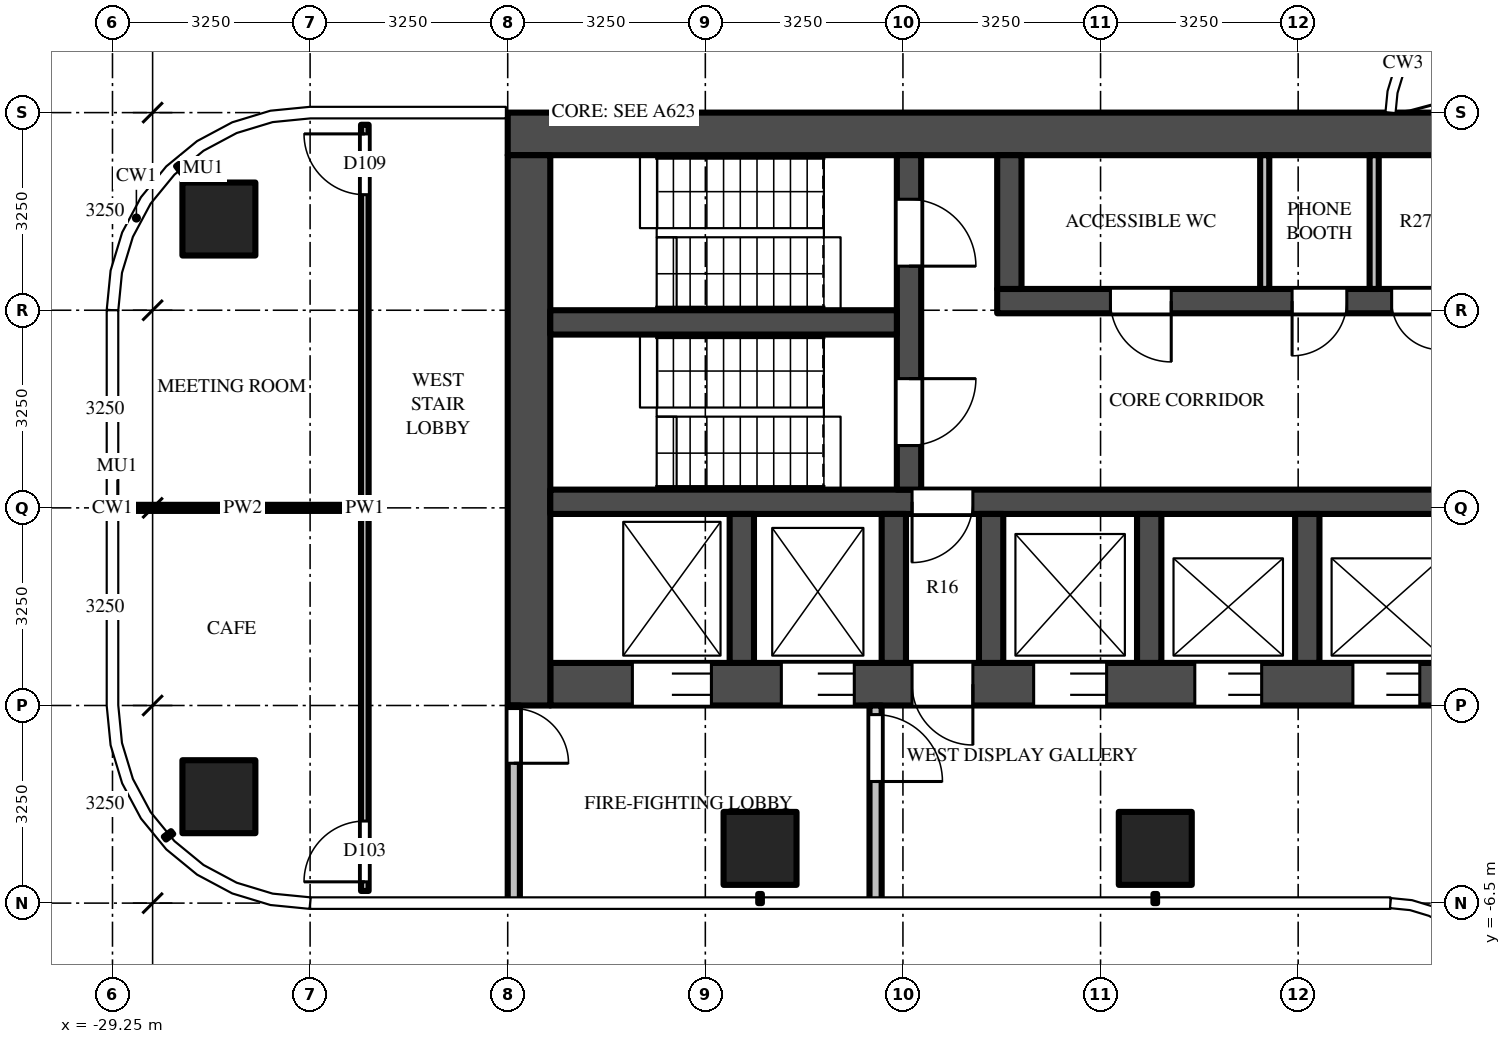
"""IFC4 building model, lengths in metres.
Left out: names, types, materials, properties, quantities, classifications, styles, units other than length and angle.
Written with IfcOpenShell. Run it as: python <this file> out.ifc"""

import sys

from ifc_helpers import new_model, si_unit, direction, frame, frame_2d, origin, origin_2d, place, context, subcontext, project, spatial, rectangle, extrude, source, transform, mapped, element, fill, save


model = new_model("IFC4")
c1 = context("Model", 3, precision=1e-05, world=origin(), true_north=direction((0.0, 1.0)))
c2 = subcontext(c1, "Body", "Model", "MODEL_VIEW")
j1 = project(units=[si_unit("LENGTHUNIT", "METRE"), si_unit("PLANEANGLEUNIT", "RADIAN")], contexts=[c1])
p1 = place(None, origin())
s1 = spatial("IfcSite", under=j1, at=p1, CompositionType="ELEMENT")
p2 = place(p1, origin())
s2 = spatial("IfcBuilding", under=s1, at=p2, CompositionType="ELEMENT")
p3 = place(p2, frame((0.0, 0.0, 193.2)))
s3 = spatial("IfcBuildingStorey", under=s2, at=p3, CompositionType="ELEMENT", Elevation=193.2)
m1 = source(origin(), c2, "Body", "SweptSolid", [
    extrude(rectangle(XDim=1.2, YDim=1.2, at=origin_2d()), origin(), (0.0, 0.0, 1.0), 3.9),
])
for number, where, z_axis, x_axis in (
    (1, (-12.1, -5.6, 0.0), (0.0, 0.0, 1.0), (1.0, 0.0, 0.0)),
    (2, (-18.6, -5.6, 0.0), (0.0, 0.0, 1.0), (1.0, 0.0, 0.0)),
    (3, (-27.5, -4.75, 0.0), (0.0, 0.0, 1.0), (1.0, 0.0, 0.0)),
    (4, (-27.5, 4.75, 0.0), (0.0, 0.0, 1.0), (1.0, 0.0, 0.0)),
):
    element("IfcColumn", number, at=place(p3, frame(where, z_axis=z_axis, x_axis=x_axis)), inside=s3, PredefinedType="COLUMN", context=c2, shape_type="MappedRepresentation", body=[
        mapped(m1, transform((0.0, 0.0, 0.0))),
    ])
m2 = source(origin(), c2, "Body", "SweptSolid", [
    extrude(rectangle(XDim=16.55, YDim=0.7, at=frame_2d((8.275, 0.0))), origin(), (0.0, 0.0, 1.0), 3.7),
])
p4 = place(p3, frame((-6.2, 6.15, 0.0), z_axis=(0.0, 0.0, 1.0), x_axis=(-1.0, 0.0, 0.0)))
e5 = element("IfcWall", 5, at=p4, inside=s3, PredefinedType="SHEAR", context=c2, shape_type="MappedRepresentation", body=[
    mapped(m2, transform((0.0, 0.0, 0.0))),
])
m3 = source(origin(), c2, "Body", "SweptSolid", [
    extrude(rectangle(XDim=14.85, YDim=0.7, at=frame_2d((7.425, 0.0))), origin(), (0.0, 0.0, 1.0), 3.7),
])
p5 = place(p3, frame((-7.2, -2.9, 0.0), z_axis=(0.0, 0.0, 1.0), x_axis=(-1.0, 0.0, 0.0)))
e6 = element("IfcWall", 6, at=p5, inside=s3, PredefinedType="SHEAR", context=c2, shape_type="MappedRepresentation", body=[
    mapped(m3, transform((0.0, 0.0, 0.0))),
])
m4 = source(origin(), c2, "Body", "SweptSolid", [
    extrude(rectangle(XDim=1.1, YDim=2.1, at=frame_2d((0.55, 1.05))), frame((0.0, 0.36, 0.0), z_axis=(0.0, -1.0, 0.0), x_axis=(1.0, 0.0, 0.0)), (0.0, 0.0, 1.0), 0.72),
])
p6 = place(p5, frame((0.55, 0.0, 0.0)))
e7 = element("IfcOpeningElement", 7, at=p6, cuts=e6, PredefinedType="OPENING", context=c2, shape_type="MappedRepresentation", body=[
    mapped(m4, transform((0.0, 0.0, 0.0))),
])
p7 = place(p5, frame((3.15, 0.0, 0.0)))
e8 = element("IfcOpeningElement", 8, at=p7, cuts=e6, PredefinedType="OPENING", context=c2, shape_type="MappedRepresentation", body=[
    mapped(m4, transform((0.0, 0.0, 0.0))),
])
m5 = source(origin(), c2, "Body", "SweptSolid", [
    extrude(rectangle(XDim=1.2, YDim=2.1, at=frame_2d((0.6, 1.05))), frame((0.0, 0.36, 0.0), z_axis=(0.0, -1.0, 0.0), x_axis=(1.0, 0.0, 0.0)), (0.0, 0.0, 1.0), 0.72),
])
p8 = place(p5, frame((5.7, 0.0, 0.0)))
e9 = element("IfcOpeningElement", 9, at=p8, cuts=e6, PredefinedType="OPENING", context=c2, shape_type="MappedRepresentation", body=[
    mapped(m5, transform((0.0, 0.0, 0.0))),
])
m6 = source(origin(), c2, "Body", "SweptSolid", [
    extrude(rectangle(XDim=1.3, YDim=2.1, at=frame_2d((0.65, 1.05))), frame((0.0, 0.36, 0.0), z_axis=(0.0, -1.0, 0.0), x_axis=(1.0, 0.0, 0.0)), (0.0, 0.0, 1.0), 0.72),
])
p9 = place(p5, frame((12.2, 0.0, 0.0)))
e10 = element("IfcOpeningElement", 10, at=p9, cuts=e6, PredefinedType="OPENING", context=c2, shape_type="MappedRepresentation", body=[
    mapped(m6, transform((0.0, 0.0, 0.0))),
])
p10 = place(p5, frame((9.85, 0.0, 0.0)))
e11 = element("IfcOpeningElement", 11, at=p10, cuts=e6, PredefinedType="OPENING", context=c2, shape_type="MappedRepresentation", body=[
    mapped(m5, transform((0.0, 0.0, 0.0))),
])
m7 = source(origin(), c2, "Body", "SweptSolid", [
    extrude(rectangle(XDim=1.0, YDim=2.1, at=frame_2d((0.5, 1.05))), frame((0.0, 0.36, 0.0), z_axis=(0.0, -1.0, 0.0), x_axis=(1.0, 0.0, 0.0)), (0.0, 0.0, 1.0), 0.72),
])
p11 = place(p5, frame((7.9, 0.0, 0.0)))
e12 = element("IfcOpeningElement", 12, at=p11, cuts=e6, PredefinedType="OPENING", context=c2, shape_type="MappedRepresentation", body=[
    mapped(m7, transform((0.0, 0.0, 0.0))),
])
m8 = source(origin(), c2, "Body", "SweptSolid", [
    extrude(rectangle(XDim=9.05, YDim=0.7, at=frame_2d((4.525, 0.0))), origin(), (0.0, 0.0, 1.0), 3.7),
])
p12 = place(p3, frame((-22.4, 5.8, 0.0), z_axis=(0.0, 0.0, 1.0), x_axis=(0.0, -1.0, 0.0)))
e13 = element("IfcWall", 13, at=p12, inside=s3, PredefinedType="SHEAR", context=c2, shape_type="MappedRepresentation", body=[
    mapped(m8, transform((0.0, 0.0, 0.0))),
])
m9 = source(origin(), c2, "Body", "SweptSolid", [
    extrude(rectangle(XDim=7.5, YDim=0.4, at=frame_2d((3.75, 0.0))), origin(), (0.0, 0.0, 1.0), 3.7),
])
p13 = place(p3, frame((-7.2, 3.4, 0.0), z_axis=(0.0, 0.0, 1.0), x_axis=(-1.0, 0.0, 0.0)))
e14 = element("IfcWall", 14, at=p13, inside=s3, PredefinedType="SHEAR", context=c2, shape_type="MappedRepresentation", body=[
    mapped(m9, transform((0.0, 0.0, 0.0))),
])
m10 = source(origin(), c2, "Body", "SweptSolid", [
    extrude(rectangle(XDim=0.8, YDim=2.1, at=frame_2d((0.4, 1.05))), frame((0.0, 0.21, 0.0), z_axis=(0.0, -1.0, 0.0), x_axis=(1.0, 0.0, 0.0)), (0.0, 0.0, 1.0), 0.42),
])
p14 = place(p13, frame((0.212, 0.0, 0.0)))
e15 = element("IfcOpeningElement", 15, at=p14, cuts=e14, PredefinedType="OPENING", context=c2, shape_type="MappedRepresentation", body=[
    mapped(m10, transform((0.0, 0.0, 0.0))),
])
m11 = source(origin(), c2, "Body", "SweptSolid", [
    extrude(rectangle(XDim=0.9, YDim=2.1, at=frame_2d((0.45, 1.05))), frame((0.0, 0.21, 0.0), z_axis=(0.0, -1.0, 0.0), x_axis=(1.0, 0.0, 0.0)), (0.0, 0.0, 1.0), 0.42),
])
p15 = place(p13, frame((1.75, 0.0, 0.0)))
e16 = element("IfcOpeningElement", 16, at=p15, cuts=e14, PredefinedType="OPENING", context=c2, shape_type="MappedRepresentation", body=[
    mapped(m11, transform((0.0, 0.0, 0.0))),
])
m12 = source(origin(), c2, "Body", "SweptSolid", [
    extrude(rectangle(XDim=1.0, YDim=2.1, at=frame_2d((0.5, 1.05))), frame((0.0, 0.21, 0.0), z_axis=(0.0, -1.0, 0.0), x_axis=(1.0, 0.0, 0.0)), (0.0, 0.0, 1.0), 0.42),
])
p16 = place(p13, frame((4.637, 0.0, 0.0)))
e17 = element("IfcOpeningElement", 17, at=p16, cuts=e14, PredefinedType="OPENING", context=c2, shape_type="MappedRepresentation", body=[
    mapped(m12, transform((0.0, 0.0, 0.0))),
])
m13 = source(origin(), c2, "Body", "SweptSolid", [
    extrude(rectangle(XDim=14.85, YDim=0.4, at=frame_2d((7.425, 0.0))), origin(), (0.0, 0.0, 1.0), 3.7),
])
p17 = place(p3, frame((-7.2, 0.1, 0.0), z_axis=(0.0, 0.0, 1.0), x_axis=(-1.0, 0.0, 0.0)))
e18 = element("IfcWall", 18, at=p17, inside=s3, PredefinedType="SHEAR", context=c2, shape_type="MappedRepresentation", body=[
    mapped(m13, transform((0.0, 0.0, 0.0))),
])
p18 = place(p17, frame((7.9, 0.0, 0.0)))
e19 = element("IfcOpeningElement", 19, at=p18, cuts=e18, PredefinedType="OPENING", context=c2, shape_type="MappedRepresentation", body=[
    mapped(m12, transform((0.0, 0.0, 0.0))),
])
m14 = source(origin(), c2, "Body", "SweptSolid", [
    extrude(rectangle(XDim=5.5, YDim=0.4, at=frame_2d((2.75, 0.0))), origin(), (0.0, 0.0, 1.0), 3.7),
])
p19 = place(p3, frame((-16.15, 5.8, 0.0), z_axis=(0.0, 0.0, 1.0), x_axis=(0.0, -1.0, 0.0)))
e20 = element("IfcWall", 20, at=p19, inside=s3, PredefinedType="SHEAR", context=c2, shape_type="MappedRepresentation", body=[
    mapped(m14, transform((0.0, 0.0, 0.0))),
])
m15 = source(origin(), c2, "Body", "SweptSolid", [
    extrude(rectangle(XDim=1.1, YDim=2.1, at=frame_2d((0.55, 1.05))), frame((0.0, 0.21, 0.0), z_axis=(0.0, -1.0, 0.0), x_axis=(1.0, 0.0, 0.0)), (0.0, 0.0, 1.0), 0.42),
])
p20 = place(p19, frame((0.725, 0.0, 0.0)))
e21 = element("IfcOpeningElement", 21, at=p20, cuts=e20, PredefinedType="OPENING", context=c2, shape_type="MappedRepresentation", body=[
    mapped(m15, transform((0.0, 0.0, 0.0))),
])
p21 = place(p19, frame((3.675, 0.0, 0.0)))
e22 = element("IfcOpeningElement", 22, at=p21, cuts=e20, PredefinedType="OPENING", context=c2, shape_type="MappedRepresentation", body=[
    mapped(m15, transform((0.0, 0.0, 0.0))),
])
m16 = source(origin(), c2, "Body", "SweptSolid", [
    extrude(rectangle(XDim=5.7, YDim=0.4, at=frame_2d((2.85, 0.0))), origin(), (0.0, 0.0, 1.0), 3.7),
])
p22 = place(p3, frame((-16.35, 3.05, 0.0), z_axis=(0.0, 0.0, 1.0), x_axis=(-1.0, 0.0, 0.0)))
e23 = element("IfcWall", 23, at=p22, inside=s3, PredefinedType="SHEAR", context=c2, shape_type="MappedRepresentation", body=[
    mapped(m16, transform((0.0, 0.0, 0.0))),
])
m17 = source(origin(), c2, "Body", "SweptSolid", [
    extrude(rectangle(XDim=2.2, YDim=0.4, at=frame_2d((1.1, 0.0))), origin(), (0.0, 0.0, 1.0), 3.7),
])
p23 = place(p3, frame((-14.5, 5.8, 0.0), z_axis=(0.0, 0.0, 1.0), x_axis=(0.0, -1.0, 0.0)))
e24 = element("IfcWall", 24, at=p23, inside=s3, PredefinedType="SHEAR", context=c2, shape_type="MappedRepresentation", body=[
    mapped(m17, transform((0.0, 0.0, 0.0))),
])
m18 = source(origin(), c2, "Body", "SweptSolid", [
    extrude(rectangle(XDim=2.45, YDim=0.4, at=frame_2d((1.225, 0.0))), origin(), (0.0, 0.0, 1.0), 3.7),
])
for number, where, z_axis, x_axis in (
    (25, (-9.6, -0.1, 0.0), (0.0, 0.0, 1.0), (0.0, -1.0, 0.0)),
    (26, (-12.2, -0.1, 0.0), (0.0, 0.0, 1.0), (0.0, -1.0, 0.0)),
    (27, (-14.8, -0.1, 0.0), (0.0, 0.0, 1.0), (0.0, -1.0, 0.0)),
    (28, (-16.4, -0.1, 0.0), (0.0, 0.0, 1.0), (0.0, -1.0, 0.0)),
    (29, (-18.9, -0.1, 0.0), (0.0, 0.0, 1.0), (0.0, -1.0, 0.0)),
):
    element("IfcWall", number, at=place(p3, frame(where, z_axis=z_axis, x_axis=x_axis)), inside=s3, PredefinedType="SHEAR", context=c2, shape_type="MappedRepresentation", body=[
        mapped(m18, transform((0.0, 0.0, 0.0))),
    ])
m19 = source(origin(), c2, "Body", "SweptSolid", [
    extrude(rectangle(XDim=3.25, YDim=0.2, at=frame_2d((1.625, 0.0))), origin(), (0.0, 0.0, 1.0), 3.7),
])
p24 = place(p3, frame((-16.7, -3.25, 0.0), z_axis=(0.0, 0.0, 1.0), x_axis=(0.0, -1.0, 0.0)))
e30 = element("IfcWall", 30, at=p24, inside=s3, PredefinedType="PARTITIONING", context=c2, shape_type="MappedRepresentation", body=[
    mapped(m19, transform((0.0, 0.0, 0.0))),
])
m20 = source(origin(), c2, "Body", "SweptSolid", [
    extrude(rectangle(XDim=1.1, YDim=2.1, at=frame_2d((0.55, 1.05))), frame((0.0, 0.11, 0.0), z_axis=(0.0, -1.0, 0.0), x_axis=(1.0, 0.0, 0.0)), (0.0, 0.0, 1.0), 0.22),
])
p25 = place(p24, frame((0.15, 0.0, 0.0)))
e31 = element("IfcOpeningElement", 31, at=p25, cuts=e30, PredefinedType="OPENING", context=c2, shape_type="MappedRepresentation", body=[
    mapped(m20, transform((0.0, 0.0, 0.0))),
])
p26 = place(p3, frame((-22.65, -3.25, 0.0), z_axis=(0.0, 0.0, 1.0), x_axis=(0.0, -1.0, 0.0)))
e32 = element("IfcWall", 32, at=p26, inside=s3, PredefinedType="PARTITIONING", context=c2, shape_type="MappedRepresentation", body=[
    mapped(m19, transform((0.0, 0.0, 0.0))),
])
m21 = source(origin(), c2, "Body", "SweptSolid", [
    extrude(rectangle(XDim=0.9, YDim=2.1, at=frame_2d((0.45, 1.05))), frame((0.0, 0.11, 0.0), z_axis=(0.0, -1.0, 0.0), x_axis=(1.0, 0.0, 0.0)), (0.0, 0.0, 1.0), 0.22),
])
p27 = place(p26, frame((0.05, 0.0, 0.0)))
e33 = element("IfcOpeningElement", 33, at=p27, cuts=e32, PredefinedType="OPENING", context=c2, shape_type="MappedRepresentation", body=[
    mapped(m21, transform((0.0, 0.0, 0.0))),
])
m22 = source(origin(), c2, "Body", "SweptSolid", [
    extrude(rectangle(XDim=2.2, YDim=0.15, at=frame_2d((1.1, 0.0))), origin(), (0.0, 0.0, 1.0), 3.7),
])
for number, where, z_axis, x_axis in (
    (34, (-8.5, 5.8, 0.0), (0.0, 0.0, 1.0), (0.0, -1.0, 0.0)),
    (35, (-10.3, 5.8, 0.0), (0.0, 0.0, 1.0), (0.0, -1.0, 0.0)),
):
    element("IfcWall", number, at=place(p3, frame(where, z_axis=z_axis, x_axis=x_axis)), inside=s3, PredefinedType="PARTITIONING", context=c2, shape_type="MappedRepresentation", body=[
        mapped(m22, transform((0.0, 0.0, 0.0))),
    ])
m23 = source(origin(), c2, "Body", "SweptSolid", [
    extrude(rectangle(XDim=12.6, YDim=0.125, at=frame_2d((6.3, 0.0))), origin(), (0.0, 0.0, 1.0), 2.78),
])
p28 = place(p3, frame((-25.1, -6.3, 0.0), z_axis=(0.0, 0.0, 1.0), x_axis=(0.0, 1.0, 0.0)))
e36 = element("IfcWall", 36, at=p28, inside=s3, PredefinedType="PARTITIONING", context=c2, shape_type="MappedRepresentation", body=[
    mapped(m23, transform((0.0, 0.0, 0.0))),
])
m24 = source(origin(), c2, "Body", "SweptSolid", [
    extrude(rectangle(XDim=1.0, YDim=2.1, at=frame_2d((0.5, 1.05))), frame((0.0, 0.073, 0.0), z_axis=(0.0, -1.0, 0.0), x_axis=(1.0, 0.0, 0.0)), (0.0, 0.0, 1.0), 0.145),
])
p29 = place(p28, frame((0.15, 0.0, 0.0)))
e37 = element("IfcOpeningElement", 37, at=p29, cuts=e36, PredefinedType="OPENING", context=c2, shape_type="MappedRepresentation", body=[
    mapped(m24, transform((0.0, 0.0, 0.0))),
])
p30 = place(p28, frame((11.45, 0.0, 0.0)))
e38 = element("IfcOpeningElement", 38, at=p30, cuts=e36, PredefinedType="OPENING", context=c2, shape_type="MappedRepresentation", body=[
    mapped(m24, transform((0.0, 0.0, 0.0))),
])
m25 = source(origin(), c2, "Body", "SweptSolid", [
    extrude(rectangle(XDim=3.887, YDim=0.1, at=frame_2d((1.944, 0.0))), origin(), (0.0, 0.0, 1.0), 2.78),
])
p31 = place(p3, frame((-29.05, 0.0, 0.0), z_axis=(0.0, 0.0, 1.0), x_axis=(1.0, 0.0, 0.0)))
e39 = element("IfcWall", 39, at=p31, inside=s3, PredefinedType="PARTITIONING", context=c2, shape_type="MappedRepresentation", body=[
    mapped(m25, transform((0.0, 0.0, 0.0))),
])
m26 = source(origin(), c2, "Body", "SweptSolid", [
    extrude(rectangle(XDim=1.1, YDim=2.1, at=frame_2d((0.55, 1.05))), frame((0.0, -0.275, 0.0), z_axis=(0.0, -1.0, 0.0), x_axis=(1.0, 0.0, 0.0)), (0.0, 0.0, 1.0), 0.05),
])
p32 = place(p6, origin())
e40 = element("IfcDoor", 40, at=p32, inside=s3, OperationType="DOUBLE_DOOR_SLIDING", PredefinedType="DOOR", context=c2, shape_type="MappedRepresentation", body=[
    mapped(m26, transform((0.0, 0.0, 0.0))),
])
fill(e7, e40)
p33 = place(p7, origin())
e41 = element("IfcDoor", 41, at=p33, inside=s3, OperationType="DOUBLE_DOOR_SLIDING", PredefinedType="DOOR", context=c2, shape_type="MappedRepresentation", body=[
    mapped(m26, transform((0.0, 0.0, 0.0))),
])
fill(e8, e41)
m27 = source(origin(), c2, "Body", "SweptSolid", [
    extrude(rectangle(XDim=1.2, YDim=2.1, at=frame_2d((0.6, 1.05))), frame((0.0, -0.275, 0.0), z_axis=(0.0, -1.0, 0.0), x_axis=(1.0, 0.0, 0.0)), (0.0, 0.0, 1.0), 0.05),
])
p34 = place(p8, origin())
e42 = element("IfcDoor", 42, at=p34, inside=s3, OperationType="DOUBLE_DOOR_SLIDING", PredefinedType="DOOR", context=c2, shape_type="MappedRepresentation", body=[
    mapped(m27, transform((0.0, 0.0, 0.0))),
])
fill(e9, e42)
m28 = source(origin(), c2, "Body", "SweptSolid", [
    extrude(rectangle(XDim=1.3, YDim=2.1, at=frame_2d((0.65, 1.05))), frame((0.0, -0.275, 0.0), z_axis=(0.0, -1.0, 0.0), x_axis=(1.0, 0.0, 0.0)), (0.0, 0.0, 1.0), 0.05),
])
p35 = place(p9, origin())
e43 = element("IfcDoor", 43, at=p35, inside=s3, OperationType="DOUBLE_DOOR_SLIDING", PredefinedType="DOOR", context=c2, shape_type="MappedRepresentation", body=[
    mapped(m28, transform((0.0, 0.0, 0.0))),
])
fill(e10, e43)
p36 = place(p10, origin())
e44 = element("IfcDoor", 44, at=p36, inside=s3, OperationType="DOUBLE_DOOR_SLIDING", PredefinedType="DOOR", context=c2, shape_type="MappedRepresentation", body=[
    mapped(m27, transform((0.0, 0.0, 0.0))),
])
fill(e11, e44)
m29 = source(origin(), c2, "Body", "SweptSolid", [
    extrude(rectangle(XDim=1.1, YDim=2.1, at=frame_2d((0.55, 1.05))), frame((0.0, 0.025, 0.0), z_axis=(0.0, -1.0, 0.0), x_axis=(1.0, 0.0, 0.0)), (0.0, 0.0, 1.0), 0.05),
])
p37 = place(p20, origin())
e45 = element("IfcDoor", 45, at=p37, inside=s3, OperationType="SINGLE_SWING_RIGHT", PredefinedType="DOOR", context=c2, shape_type="MappedRepresentation", body=[
    mapped(m29, transform((0.0, 0.0, 0.0))),
])
fill(e21, e45)
p38 = place(p21, origin())
e46 = element("IfcDoor", 46, at=p38, inside=s3, OperationType="SINGLE_SWING_LEFT", PredefinedType="DOOR", context=c2, shape_type="MappedRepresentation", body=[
    mapped(m29, transform((0.0, 0.0, 0.0))),
])
fill(e22, e46)
m30 = source(origin(), c2, "Body", "SweptSolid", [
    extrude(rectangle(XDim=1.0, YDim=2.1, at=frame_2d((0.5, 1.05))), frame((0.0, 0.025, 0.0), z_axis=(0.0, -1.0, 0.0), x_axis=(1.0, 0.0, 0.0)), (0.0, 0.0, 1.0), 0.05),
])
p39 = place(p18, origin())
e47 = element("IfcDoor", 47, at=p39, inside=s3, OperationType="SINGLE_SWING_RIGHT", PredefinedType="DOOR", context=c2, shape_type="MappedRepresentation", body=[
    mapped(m30, transform((0.0, 0.0, 0.0))),
])
fill(e19, e47)
m31 = source(origin(), c2, "Body", "SweptSolid", [
    extrude(rectangle(XDim=1.0, YDim=2.1, at=frame_2d((0.5, 1.05))), frame((0.0, -0.275, 0.0), z_axis=(0.0, -1.0, 0.0), x_axis=(1.0, 0.0, 0.0)), (0.0, 0.0, 1.0), 0.05),
])
p40 = place(p11, origin())
e48 = element("IfcDoor", 48, at=p40, inside=s3, OperationType="SINGLE_SWING_LEFT", PredefinedType="DOOR", context=c2, shape_type="MappedRepresentation", body=[
    mapped(m31, transform((0.0, 0.0, 0.0))),
])
fill(e12, e48)
p41 = place(p25, origin())
e49 = element("IfcDoor", 49, at=p41, inside=s3, OperationType="SINGLE_SWING_RIGHT", PredefinedType="DOOR", context=c2, shape_type="MappedRepresentation", body=[
    mapped(m29, transform((0.0, 0.0, 0.0))),
])
fill(e31, e49)
m32 = source(origin(), c2, "Body", "SweptSolid", [
    extrude(rectangle(XDim=0.9, YDim=2.1, at=frame_2d((0.45, 1.05))), frame((0.0, 0.025, 0.0), z_axis=(0.0, -1.0, 0.0), x_axis=(1.0, 0.0, 0.0)), (0.0, 0.0, 1.0), 0.05),
])
p42 = place(p27, origin())
e50 = element("IfcDoor", 50, at=p42, inside=s3, OperationType="SINGLE_SWING_RIGHT", PredefinedType="DOOR", context=c2, shape_type="MappedRepresentation", body=[
    mapped(m32, transform((0.0, 0.0, 0.0))),
])
fill(e33, e50)
m33 = source(origin(), c2, "Body", "SweptSolid", [
    extrude(rectangle(XDim=0.8, YDim=2.1, at=frame_2d((0.4, 1.05))), frame((0.0, 0.025, 0.0), z_axis=(0.0, -1.0, 0.0), x_axis=(1.0, 0.0, 0.0)), (0.0, 0.0, 1.0), 0.05),
])
p43 = place(p14, origin())
e51 = element("IfcDoor", 51, at=p43, inside=s3, OperationType="SINGLE_SWING_LEFT", PredefinedType="DOOR", context=c2, shape_type="MappedRepresentation", body=[
    mapped(m33, transform((0.0, 0.0, 0.0))),
])
fill(e15, e51)
p44 = place(p15, origin())
e52 = element("IfcDoor", 52, at=p44, inside=s3, OperationType="SINGLE_SWING_RIGHT", PredefinedType="DOOR", context=c2, shape_type="MappedRepresentation", body=[
    mapped(m32, transform((0.0, 0.0, 0.0))),
])
fill(e16, e52)
p45 = place(p16, origin())
e53 = element("IfcDoor", 53, at=p45, inside=s3, OperationType="SINGLE_SWING_LEFT", PredefinedType="DOOR", context=c2, shape_type="MappedRepresentation", body=[
    mapped(m30, transform((0.0, 0.0, 0.0))),
])
fill(e17, e53)
p46 = place(p29, origin())
e54 = element("IfcDoor", 54, at=p46, inside=s3, OperationType="SINGLE_SWING_LEFT", PredefinedType="DOOR", context=c2, shape_type="MappedRepresentation", body=[
    mapped(m30, transform((0.0, 0.0, 0.0))),
])
fill(e37, e54)
p47 = place(p30, origin())
e55 = element("IfcDoor", 55, at=p47, inside=s3, OperationType="SINGLE_SWING_RIGHT", PredefinedType="DOOR", context=c2, shape_type="MappedRepresentation", body=[
    mapped(m30, transform((0.0, 0.0, 0.0))),
])
fill(e38, e55)
save(model, sys.argv[1])
